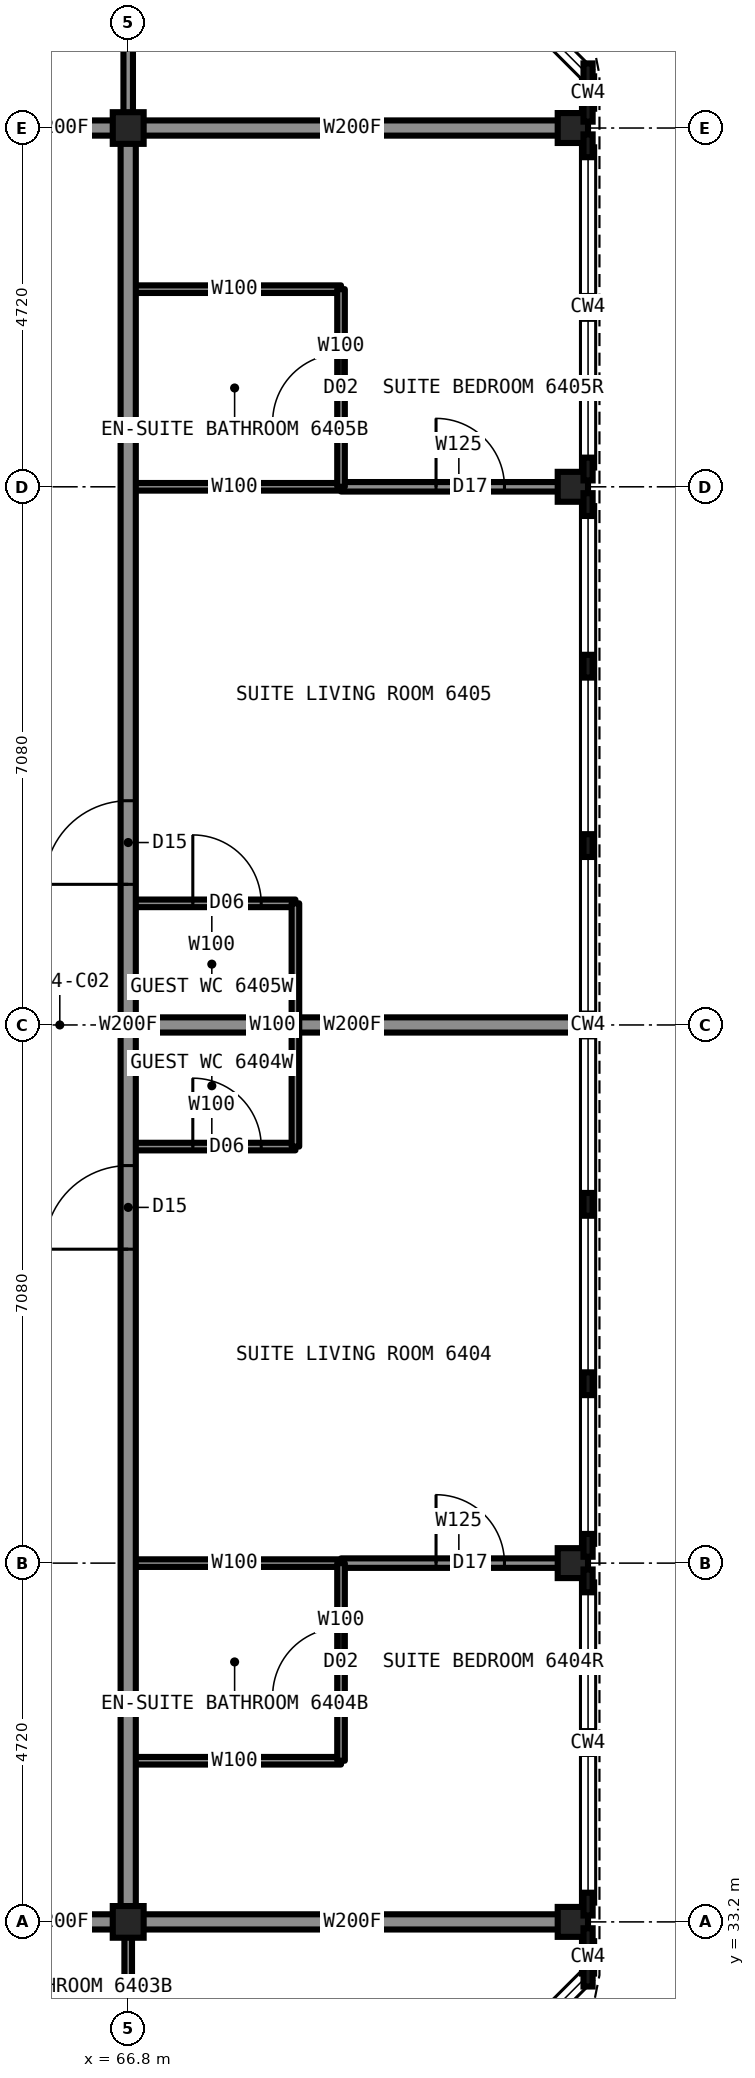
"""IFC4 building model, lengths in metres.
Left out: names, types, materials, properties, quantities, classifications, styles, units other than length and angle.
Written with IfcOpenShell. Run it as: python <this file> out.ifc"""

import sys

from ifc_helpers import new_model, si_unit, direction, frame, frame_2d, origin, origin_2d, place, context, subcontext, project, spatial, rectangle, i_section, extrude, element, fill, save


model = new_model("IFC4")
c1 = context("Model", 3, precision=1e-05, world=origin(), true_north=direction((0.0, 1.0)))
c2 = subcontext(c1, "Body", "Model", "MODEL_VIEW")
j1 = project(units=[si_unit("LENGTHUNIT", "METRE"), si_unit("PLANEANGLEUNIT", "RADIAN")], contexts=[c1])
p1 = place(None, origin())
s1 = spatial("IfcSite", under=j1, at=p1, CompositionType="ELEMENT")
p2 = place(p1, origin())
s2 = spatial("IfcBuilding", under=s1, at=p2, CompositionType="ELEMENT")
p3 = place(p2, frame((0.0, 0.0, 237.2)))
s3 = spatial("IfcBuildingStorey", under=s2, at=p3, CompositionType="ELEMENT", Elevation=237.2)
for number, where, z_axis, x_axis in (
    (1, (72.65, 33.2, 0.0), (0.0, 0.0, 1.0), (1.0, 0.0, 0.0)),
    (2, (72.65, 37.92, 0.0), (0.0, 0.0, 1.0), (1.0, 0.0, 0.0)),
    (3, (72.65, 52.08, 0.0), (0.0, 0.0, 1.0), (1.0, 0.0, 0.0)),
    (4, (72.65, 56.8, 0.0), (0.0, 0.0, 1.0), (1.0, 0.0, 0.0)),
):
    element("IfcColumn", number, at=place(p3, frame(where, z_axis=z_axis, x_axis=x_axis)), inside=s3, PredefinedType="COLUMN", context=c2, shape_type="SweptSolid", body=[
        extrude(i_section(OverallWidth=0.399, OverallDepth=0.394, WebThickness=0.023, FlangeThickness=0.037, at=origin_2d()), origin(), (0.0, 0.0, 1.0), 3.5),
    ])
for number, where, z_axis, x_axis in (
    (5, (66.8, 33.2, 0.0), (0.0, 0.0, 1.0), (1.0, 0.0, 0.0)),
    (6, (66.8, 56.8, 0.0), (0.0, 0.0, 1.0), (1.0, 0.0, 0.0)),
):
    element("IfcColumn", number, at=place(p3, frame(where, z_axis=z_axis, x_axis=x_axis)), inside=s3, PredefinedType="COLUMN", context=c2, shape_type="SweptSolid", body=[
        extrude(i_section(OverallWidth=0.406, OverallDepth=0.417, WebThickness=0.03, FlangeThickness=0.048, at=origin_2d()), origin(), (0.0, 0.0, 1.0), 3.5),
    ])
p4 = place(p3, frame((66.8, 43.4, 0.0), z_axis=(0.0, 0.0, 1.0), x_axis=(1.0, 0.0, 0.0)))
e7 = element("IfcWall", 7, at=p4, inside=s3, PredefinedType="PARTITIONING", context=c2, shape_type="SweptSolid", body=[
    extrude(rectangle(XDim=2.2, YDim=0.1, at=frame_2d((1.1, 0.0))), origin(), (0.0, 0.0, 1.0), 3.33),
])
p5 = place(p4, frame((0.85, 0.0, 0.0)))
e8 = element("IfcOpeningElement", 8, at=p5, cuts=e7, PredefinedType="OPENING", context=c2, shape_type="SweptSolid", body=[
    extrude(rectangle(XDim=0.9, YDim=2.1, at=frame_2d((0.45, 1.05))), frame((0.0, 0.06, 0.0), z_axis=(0.0, -1.0, 0.0), x_axis=(1.0, 0.0, 0.0)), (0.0, 0.0, 1.0), 0.12),
])
p6 = place(p3, frame((65.0, 33.2, 0.0), z_axis=(0.0, 0.0, 1.0), x_axis=(1.0, 0.0, 0.0)))
e9 = element("IfcWall", 9, at=p6, inside=s3, PredefinedType="PARTITIONING", context=c2, shape_type="SweptSolid", body=[
    extrude(rectangle(XDim=1.8, YDim=0.2, at=frame_2d((0.9, 0.0))), origin(), (0.0, 0.0, 1.0), 3.33),
])
p7 = place(p3, frame((66.8, 33.2, 0.0), z_axis=(0.0, 0.0, 1.0), x_axis=(1.0, 0.0, 0.0)))
e10 = element("IfcWall", 10, at=p7, inside=s3, PredefinedType="PARTITIONING", context=c2, shape_type="SweptSolid", body=[
    extrude(rectangle(XDim=5.9, YDim=0.2, at=frame_2d((2.95, 0.0))), origin(), (0.0, 0.0, 1.0), 2.573),
])
p8 = place(p3, frame((66.8, 37.92, 0.0), z_axis=(0.0, 0.0, 1.0), x_axis=(1.0, 0.0, 0.0)))
e11 = element("IfcWall", 11, at=p8, inside=s3, PredefinedType="PARTITIONING", context=c2, shape_type="SweptSolid", body=[
    extrude(rectangle(XDim=2.8, YDim=0.1, at=frame_2d((1.4, 0.0))), origin(), (0.0, 0.0, 1.0), 2.573),
])
p9 = place(p3, frame((69.6, 37.92, 0.0), z_axis=(0.0, 0.0, 1.0), x_axis=(1.0, 0.0, 0.0)))
e12 = element("IfcWall", 12, at=p9, inside=s3, PredefinedType="PARTITIONING", context=c2, shape_type="SweptSolid", body=[
    extrude(rectangle(XDim=3.1, YDim=0.125, at=frame_2d((1.55, 0.0))), origin(), (0.0, 0.0, 1.0), 2.573),
])
p10 = place(p9, frame((1.25, 0.0, 0.0)))
e13 = element("IfcOpeningElement", 13, at=p10, cuts=e12, PredefinedType="OPENING", context=c2, shape_type="SweptSolid", body=[
    extrude(rectangle(XDim=0.9, YDim=2.2, at=frame_2d((0.45, 1.1))), frame((0.0, 0.073, 0.0), z_axis=(0.0, -1.0, 0.0), x_axis=(1.0, 0.0, 0.0)), (0.0, 0.0, 1.0), 0.145),
])
p11 = place(p3, frame((66.8, 35.32, 0.0), z_axis=(0.0, 0.0, 1.0), x_axis=(1.0, 0.0, 0.0)))
e14 = element("IfcWall", 14, at=p11, inside=s3, PredefinedType="PARTITIONING", context=c2, shape_type="SweptSolid", body=[
    extrude(rectangle(XDim=2.8, YDim=0.1, at=frame_2d((1.4, 0.0))), origin(), (0.0, 0.0, 1.0), 3.33),
])
p12 = place(p3, frame((66.8, 45.0, 0.0), z_axis=(0.0, 0.0, 1.0), x_axis=(1.0, 0.0, 0.0)))
e15 = element("IfcWall", 15, at=p12, inside=s3, PredefinedType="PARTITIONING", context=c2, shape_type="SweptSolid", body=[
    extrude(rectangle(XDim=5.9, YDim=0.2, at=frame_2d((2.95, 0.0))), origin(), (0.0, 0.0, 1.0), 2.797),
])
p13 = place(p3, frame((66.8, 46.6, 0.0), z_axis=(0.0, 0.0, 1.0), x_axis=(1.0, 0.0, 0.0)))
e16 = element("IfcWall", 16, at=p13, inside=s3, PredefinedType="PARTITIONING", context=c2, shape_type="SweptSolid", body=[
    extrude(rectangle(XDim=2.2, YDim=0.1, at=frame_2d((1.1, 0.0))), origin(), (0.0, 0.0, 1.0), 3.33),
])
p14 = place(p13, frame((0.85, 0.0, 0.0)))
e17 = element("IfcOpeningElement", 17, at=p14, cuts=e16, PredefinedType="OPENING", context=c2, shape_type="SweptSolid", body=[
    extrude(rectangle(XDim=0.9, YDim=2.1, at=frame_2d((0.45, 1.05))), frame((0.0, 0.06, 0.0), z_axis=(0.0, -1.0, 0.0), x_axis=(1.0, 0.0, 0.0)), (0.0, 0.0, 1.0), 0.12),
])
p15 = place(p3, frame((65.0, 56.8, 0.0), z_axis=(0.0, 0.0, 1.0), x_axis=(1.0, 0.0, 0.0)))
e18 = element("IfcWall", 18, at=p15, inside=s3, PredefinedType="PARTITIONING", context=c2, shape_type="SweptSolid", body=[
    extrude(rectangle(XDim=1.8, YDim=0.2, at=frame_2d((0.9, 0.0))), origin(), (0.0, 0.0, 1.0), 3.33),
])
p16 = place(p3, frame((66.8, 56.8, 0.0), z_axis=(0.0, 0.0, 1.0), x_axis=(1.0, 0.0, 0.0)))
e19 = element("IfcWall", 19, at=p16, inside=s3, PredefinedType="PARTITIONING", context=c2, shape_type="SweptSolid", body=[
    extrude(rectangle(XDim=5.9, YDim=0.2, at=frame_2d((2.95, 0.0))), origin(), (0.0, 0.0, 1.0), 2.573),
])
p17 = place(p3, frame((66.8, 52.08, 0.0), z_axis=(0.0, 0.0, 1.0), x_axis=(1.0, 0.0, 0.0)))
e20 = element("IfcWall", 20, at=p17, inside=s3, PredefinedType="PARTITIONING", context=c2, shape_type="SweptSolid", body=[
    extrude(rectangle(XDim=2.8, YDim=0.1, at=frame_2d((1.4, 0.0))), origin(), (0.0, 0.0, 1.0), 2.573),
])
p18 = place(p3, frame((69.6, 52.08, 0.0), z_axis=(0.0, 0.0, 1.0), x_axis=(1.0, 0.0, 0.0)))
e21 = element("IfcWall", 21, at=p18, inside=s3, PredefinedType="PARTITIONING", context=c2, shape_type="SweptSolid", body=[
    extrude(rectangle(XDim=3.1, YDim=0.125, at=frame_2d((1.55, 0.0))), origin(), (0.0, 0.0, 1.0), 2.573),
])
p19 = place(p18, frame((1.25, 0.0, 0.0)))
e22 = element("IfcOpeningElement", 22, at=p19, cuts=e21, PredefinedType="OPENING", context=c2, shape_type="SweptSolid", body=[
    extrude(rectangle(XDim=0.9, YDim=2.2, at=frame_2d((0.45, 1.1))), frame((0.0, 0.073, 0.0), z_axis=(0.0, -1.0, 0.0), x_axis=(1.0, 0.0, 0.0)), (0.0, 0.0, 1.0), 0.145),
])
p20 = place(p3, frame((66.8, 54.68, 0.0), z_axis=(0.0, 0.0, 1.0), x_axis=(1.0, 0.0, 0.0)))
e23 = element("IfcWall", 23, at=p20, inside=s3, PredefinedType="PARTITIONING", context=c2, shape_type="SweptSolid", body=[
    extrude(rectangle(XDim=2.8, YDim=0.1, at=frame_2d((1.4, 0.0))), origin(), (0.0, 0.0, 1.0), 3.33),
])
p21 = place(p3, frame((66.8, 30.4, 0.0), z_axis=(0.0, 0.0, 1.0), x_axis=(0.0, 1.0, 0.0)))
e24 = element("IfcWall", 24, at=p21, inside=s3, PredefinedType="PARTITIONING", context=c2, shape_type="SweptSolid", body=[
    extrude(rectangle(XDim=2.8, YDim=0.1, at=frame_2d((1.4, 0.0))), origin(), (0.0, 0.0, 1.0), 2.573),
])
p22 = place(p3, frame((66.8, 33.2, 0.0), z_axis=(0.0, 0.0, 1.0), x_axis=(0.0, 1.0, 0.0)))
e25 = element("IfcWall", 25, at=p22, inside=s3, PredefinedType="PARTITIONING", context=c2, shape_type="SweptSolid", body=[
    extrude(rectangle(XDim=23.6, YDim=0.2, at=frame_2d((11.8, 0.0))), origin(), (0.0, 0.0, 1.0), 3.33),
])
p23 = place(p22, frame((8.85, 0.0, 0.0)))
e26 = element("IfcOpeningElement", 26, at=p23, cuts=e25, PredefinedType="OPENING", context=c2, shape_type="SweptSolid", body=[
    extrude(rectangle(XDim=1.1, YDim=2.2, at=frame_2d((0.55, 1.1))), frame((0.0, 0.11, 0.0), z_axis=(0.0, -1.0, 0.0), x_axis=(1.0, 0.0, 0.0)), (0.0, 0.0, 1.0), 0.22),
])
p24 = place(p22, frame((13.65, 0.0, 0.0)))
e27 = element("IfcOpeningElement", 27, at=p24, cuts=e25, PredefinedType="OPENING", context=c2, shape_type="SweptSolid", body=[
    extrude(rectangle(XDim=1.1, YDim=2.2, at=frame_2d((0.55, 1.1))), frame((0.0, 0.11, 0.0), z_axis=(0.0, -1.0, 0.0), x_axis=(1.0, 0.0, 0.0)), (0.0, 0.0, 1.0), 0.22),
])
p25 = place(p3, frame((66.8, 56.8, 0.0), z_axis=(0.0, 0.0, 1.0), x_axis=(0.0, 1.0, 0.0)))
e28 = element("IfcWall", 28, at=p25, inside=s3, PredefinedType="PARTITIONING", context=c2, shape_type="SweptSolid", body=[
    extrude(rectangle(XDim=5.9, YDim=0.125, at=frame_2d((2.95, 0.0))), origin(), (0.0, 0.0, 1.0), 2.573),
])
p26 = place(p25, frame((3.55, 0.0, 0.0)))
e29 = element("IfcOpeningElement", 29, at=p26, cuts=e28, PredefinedType="OPENING", context=c2, shape_type="SweptSolid", body=[
    extrude(rectangle(XDim=0.9, YDim=2.2, at=frame_2d((0.45, 1.1))), frame((0.0, 0.073, 0.0), z_axis=(0.0, -1.0, 0.0), x_axis=(1.0, 0.0, 0.0)), (0.0, 0.0, 1.0), 0.145),
])
p27 = place(p3, frame((69.0, 43.4, 0.0), z_axis=(0.0, 0.0, 1.0), x_axis=(0.0, 1.0, 0.0)))
e30 = element("IfcWall", 30, at=p27, inside=s3, PredefinedType="PARTITIONING", context=c2, shape_type="SweptSolid", body=[
    extrude(rectangle(XDim=3.2, YDim=0.1, at=frame_2d((1.6, 0.0))), origin(), (0.0, 0.0, 1.0), 3.33),
])
p28 = place(p3, frame((69.6, 35.32, 0.0), z_axis=(0.0, 0.0, 1.0), x_axis=(0.0, 1.0, 0.0)))
e31 = element("IfcWall", 31, at=p28, inside=s3, PredefinedType="PARTITIONING", context=c2, shape_type="SweptSolid", body=[
    extrude(rectangle(XDim=2.6, YDim=0.1, at=frame_2d((1.3, 0.0))), origin(), (0.0, 0.0, 1.0), 3.33),
])
p29 = place(p28, frame((0.85, 0.0, 0.0)))
e32 = element("IfcOpeningElement", 32, at=p29, cuts=e31, PredefinedType="OPENING", context=c2, shape_type="SweptSolid", body=[
    extrude(rectangle(XDim=0.9, YDim=2.1, at=frame_2d((0.45, 1.05))), frame((0.0, 0.06, 0.0), z_axis=(0.0, -1.0, 0.0), x_axis=(1.0, 0.0, 0.0)), (0.0, 0.0, 1.0), 0.12),
])
p30 = place(p3, frame((69.6, 52.08, 0.0), z_axis=(0.0, 0.0, 1.0), x_axis=(0.0, 1.0, 0.0)))
e33 = element("IfcWall", 33, at=p30, inside=s3, PredefinedType="PARTITIONING", context=c2, shape_type="SweptSolid", body=[
    extrude(rectangle(XDim=2.6, YDim=0.1, at=frame_2d((1.3, 0.0))), origin(), (0.0, 0.0, 1.0), 3.33),
])
p31 = place(p30, frame((0.85, 0.0, 0.0)))
e34 = element("IfcOpeningElement", 34, at=p31, cuts=e33, PredefinedType="OPENING", context=c2, shape_type="SweptSolid", body=[
    extrude(rectangle(XDim=0.9, YDim=2.1, at=frame_2d((0.45, 1.05))), frame((0.0, 0.06, 0.0), z_axis=(0.0, -1.0, 0.0), x_axis=(1.0, 0.0, 0.0)), (0.0, 0.0, 1.0), 0.12),
])
p32 = place(p23, origin())
e35 = element("IfcDoor", 35, at=p32, inside=s3, OperationType="SINGLE_SWING_LEFT", PredefinedType="DOOR", context=c2, shape_type="SweptSolid", body=[
    extrude(rectangle(XDim=1.1, YDim=2.2, at=frame_2d((0.55, 1.1))), frame((0.0, 0.025, 0.0), z_axis=(0.0, -1.0, 0.0), x_axis=(1.0, 0.0, 0.0)), (0.0, 0.0, 1.0), 0.05),
])
fill(e26, e35)
p33 = place(p29, origin())
e36 = element("IfcDoor", 36, at=p33, inside=s3, OperationType="SINGLE_SWING_RIGHT", PredefinedType="DOOR", context=c2, shape_type="SweptSolid", body=[
    extrude(rectangle(XDim=0.9, YDim=2.1, at=frame_2d((0.45, 1.05))), frame((0.0, 0.025, 0.0), z_axis=(0.0, -1.0, 0.0), x_axis=(1.0, 0.0, 0.0)), (0.0, 0.0, 1.0), 0.05),
])
fill(e32, e36)
p34 = place(p10, origin())
e37 = element("IfcDoor", 37, at=p34, inside=s3, OperationType="SINGLE_SWING_LEFT", PredefinedType="DOOR", context=c2, shape_type="SweptSolid", body=[
    extrude(rectangle(XDim=0.9, YDim=2.2, at=frame_2d((0.45, 1.1))), frame((0.0, 0.025, 0.0), z_axis=(0.0, -1.0, 0.0), x_axis=(1.0, 0.0, 0.0)), (0.0, 0.0, 1.0), 0.05),
])
fill(e13, e37)
p35 = place(p5, origin())
e38 = element("IfcDoor", 38, at=p35, inside=s3, OperationType="SINGLE_SWING_LEFT", PredefinedType="DOOR", context=c2, shape_type="SweptSolid", body=[
    extrude(rectangle(XDim=0.9, YDim=2.1, at=frame_2d((0.45, 1.05))), frame((0.0, 0.025, 0.0), z_axis=(0.0, -1.0, 0.0), x_axis=(1.0, 0.0, 0.0)), (0.0, 0.0, 1.0), 0.05),
])
fill(e8, e38)
p36 = place(p24, origin())
e39 = element("IfcDoor", 39, at=p36, inside=s3, OperationType="SINGLE_SWING_LEFT", PredefinedType="DOOR", context=c2, shape_type="SweptSolid", body=[
    extrude(rectangle(XDim=1.1, YDim=2.2, at=frame_2d((0.55, 1.1))), frame((0.0, 0.025, 0.0), z_axis=(0.0, -1.0, 0.0), x_axis=(1.0, 0.0, 0.0)), (0.0, 0.0, 1.0), 0.05),
])
fill(e27, e39)
p37 = place(p31, origin())
e40 = element("IfcDoor", 40, at=p37, inside=s3, OperationType="SINGLE_SWING_RIGHT", PredefinedType="DOOR", context=c2, shape_type="SweptSolid", body=[
    extrude(rectangle(XDim=0.9, YDim=2.1, at=frame_2d((0.45, 1.05))), frame((0.0, 0.025, 0.0), z_axis=(0.0, -1.0, 0.0), x_axis=(1.0, 0.0, 0.0)), (0.0, 0.0, 1.0), 0.05),
])
fill(e34, e40)
p38 = place(p19, origin())
e41 = element("IfcDoor", 41, at=p38, inside=s3, OperationType="SINGLE_SWING_LEFT", PredefinedType="DOOR", context=c2, shape_type="SweptSolid", body=[
    extrude(rectangle(XDim=0.9, YDim=2.2, at=frame_2d((0.45, 1.1))), frame((0.0, 0.025, 0.0), z_axis=(0.0, -1.0, 0.0), x_axis=(1.0, 0.0, 0.0)), (0.0, 0.0, 1.0), 0.05),
])
fill(e22, e41)
p39 = place(p14, origin())
e42 = element("IfcDoor", 42, at=p39, inside=s3, OperationType="SINGLE_SWING_LEFT", PredefinedType="DOOR", context=c2, shape_type="SweptSolid", body=[
    extrude(rectangle(XDim=0.9, YDim=2.1, at=frame_2d((0.45, 1.05))), frame((0.0, 0.025, 0.0), z_axis=(0.0, -1.0, 0.0), x_axis=(1.0, 0.0, 0.0)), (0.0, 0.0, 1.0), 0.05),
])
fill(e17, e42)
save(model, sys.argv[1])
